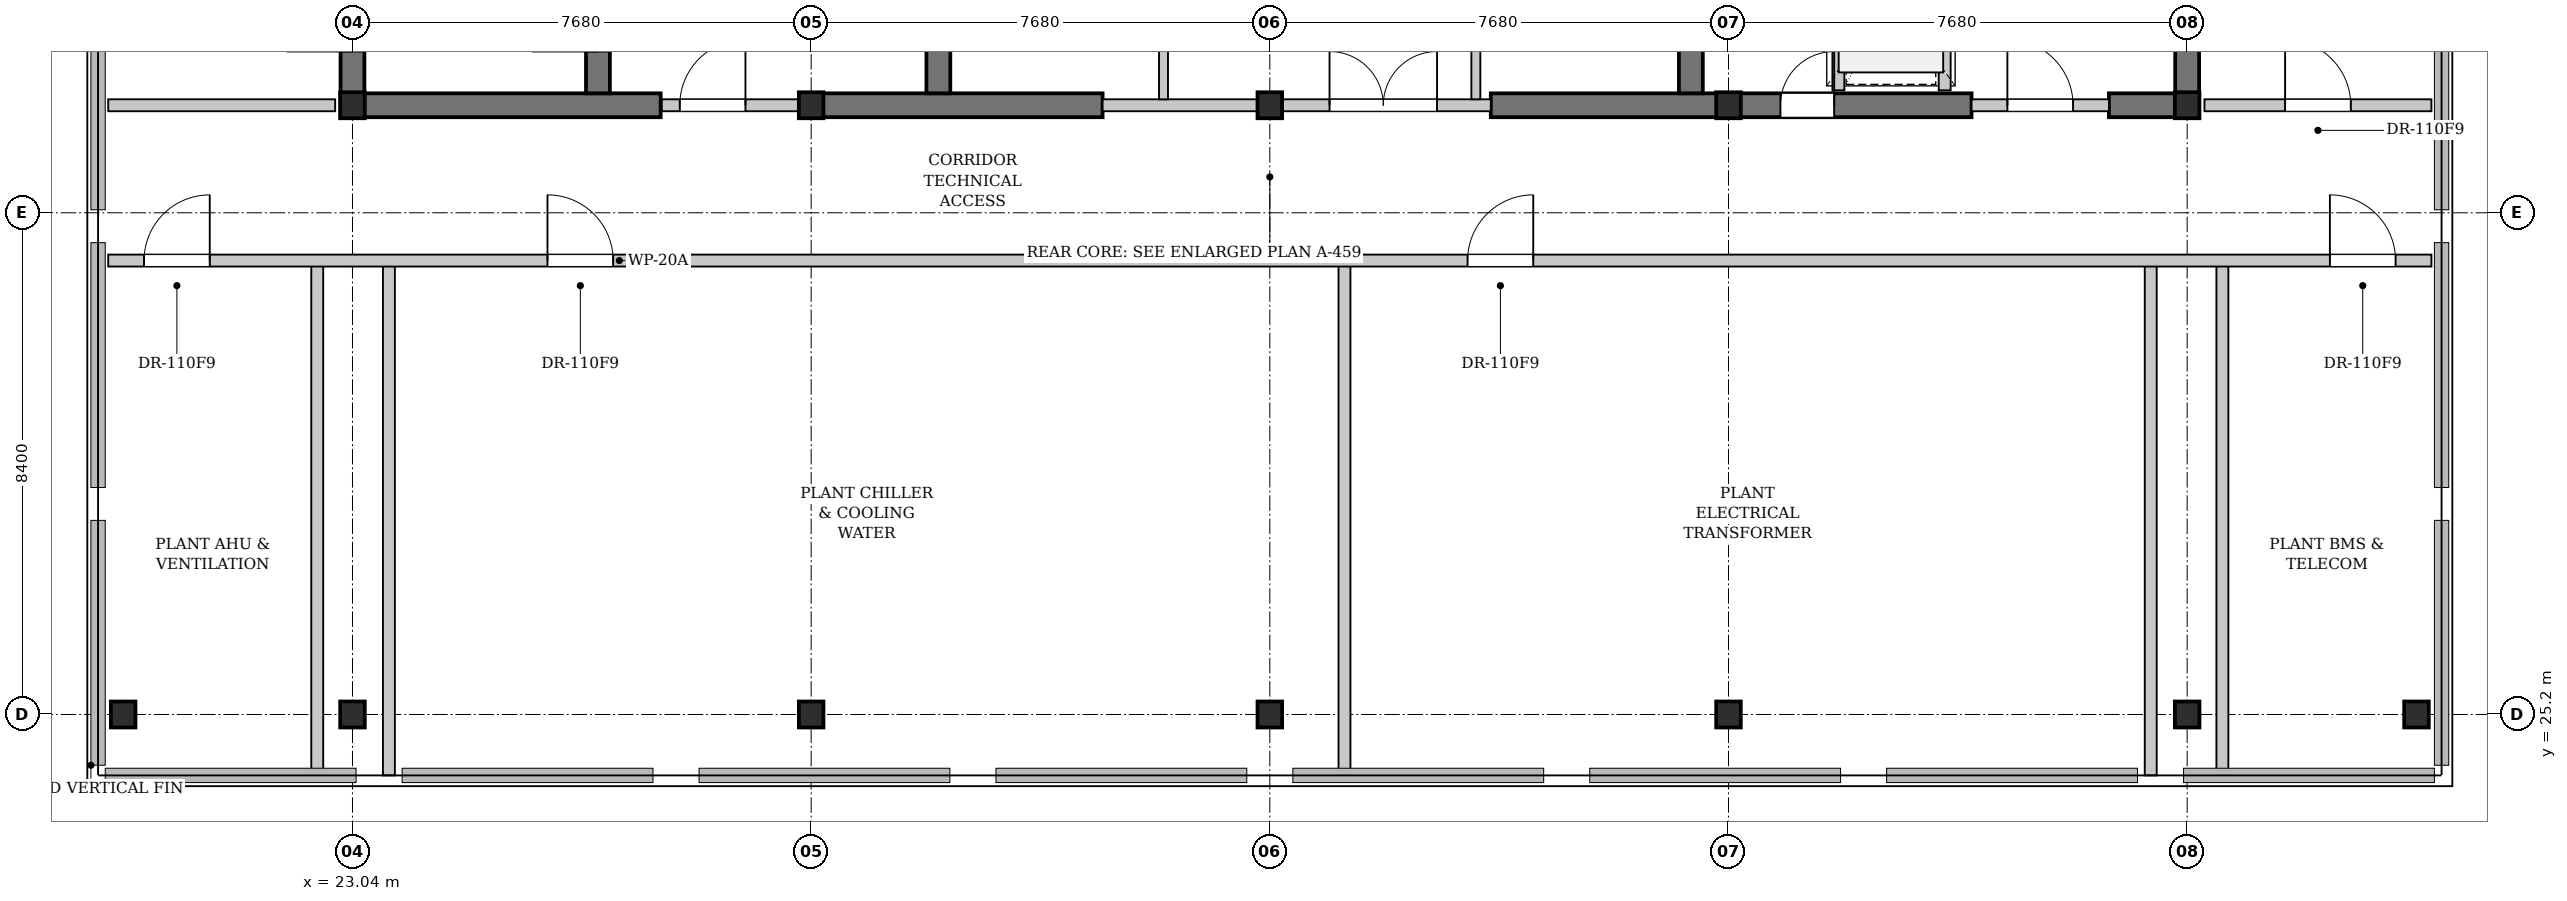
"""IFC4 building model, lengths in metres.
Left out: names, types, materials, properties, quantities, classifications, styles, units other than length and angle.
Written with IfcOpenShell. Run it as: python <this file> out.ifc"""

import sys

from ifc_helpers import new_model, si_unit, direction, frame, frame_2d, origin, origin_2d, place, context, subcontext, project, spatial, rectangle, i_section, extrude, element, fill, save


model = new_model("IFC4")
c1 = context("Model", 3, precision=1e-05, world=origin(), true_north=direction((0.0, 1.0)))
c2 = subcontext(c1, "Body", "Model", "MODEL_VIEW")
j1 = project(units=[si_unit("LENGTHUNIT", "METRE"), si_unit("PLANEANGLEUNIT", "RADIAN")], contexts=[c1])
p1 = place(None, origin())
s1 = spatial("IfcSite", under=j1, at=p1, CompositionType="ELEMENT")
p2 = place(p1, origin())
s2 = spatial("IfcBuilding", under=s1, at=p2, CompositionType="ELEMENT")
p3 = place(p2, frame((0.0, 0.0, 251.3)))
s3 = spatial("IfcBuildingStorey", under=s2, at=p3, CompositionType="ELEMENT", Elevation=251.3)
p4 = place(p3, frame((22.84, 35.4, 0.0), z_axis=(0.0, 0.0, 1.0), x_axis=(1.0, 0.0, 0.0)))
e1 = element("IfcWall", 1, at=p4, inside=s3, PredefinedType="SHEAR", context=c2, shape_type="SweptSolid", body=[
    extrude(rectangle(XDim=5.36, YDim=0.4, at=frame_2d((2.68, 0.0))), origin(), (0.0, 0.0, 1.0), 3.48),
])
p5 = place(p3, frame((30.72, 35.4, 0.0), z_axis=(0.0, 0.0, 1.0), x_axis=(1.0, 0.0, 0.0)))
e2 = element("IfcWall", 2, at=p5, inside=s3, PredefinedType="SHEAR", context=c2, shape_type="SweptSolid", body=[
    extrude(rectangle(XDim=4.88, YDim=0.4, at=frame_2d((2.44, 0.0))), origin(), (0.0, 0.0, 1.0), 3.48),
])
p6 = place(p3, frame((42.1, 35.4, 0.0), z_axis=(0.0, 0.0, 1.0), x_axis=(1.0, 0.0, 0.0)))
e3 = element("IfcWall", 3, at=p6, inside=s3, PredefinedType="SHEAR", context=c2, shape_type="SweptSolid", body=[
    extrude(rectangle(XDim=8.05, YDim=0.4, at=frame_2d((4.025, 0.0))), origin(), (0.0, 0.0, 1.0), 3.48),
])
p7 = place(p6, frame((4.85, 0.0, 0.0)))
e4 = element("IfcOpeningElement", 4, at=p7, cuts=e3, PredefinedType="OPENING", context=c2, shape_type="SweptSolid", body=[
    extrude(rectangle(XDim=0.9, YDim=2.15, at=frame_2d((0.45, 1.075))), frame((0.0, 0.21, 0.0), z_axis=(0.0, -1.0, 0.0), x_axis=(1.0, 0.0, 0.0)), (0.0, 0.0, 1.0), 0.42),
])
p8 = place(p3, frame((52.45, 35.4, 0.0), z_axis=(0.0, 0.0, 1.0), x_axis=(1.0, 0.0, 0.0)))
e5 = element("IfcWall", 5, at=p8, inside=s3, PredefinedType="SHEAR", context=c2, shape_type="SweptSolid", body=[
    extrude(rectangle(XDim=1.51, YDim=0.4, at=frame_2d((0.755, 0.0))), origin(), (0.0, 0.0, 1.0), 3.48),
])
p9 = place(p3, frame((23.04, 35.6, 0.0), z_axis=(0.0, 0.0, 1.0), x_axis=(0.0, 1.0, 0.0)))
e6 = element("IfcWall", 6, at=p9, inside=s3, PredefinedType="SHEAR", context=c2, shape_type="SweptSolid", body=[
    extrude(rectangle(XDim=10.4, YDim=0.4, at=frame_2d((5.2, 0.0))), origin(), (0.0, 0.0, 1.0), 3.48),
])
p10 = place(p9, frame((0.7, 0.0, 0.0)))
e7 = element("IfcOpeningElement", 7, at=p10, cuts=e6, PredefinedType="OPENING", context=c2, shape_type="SweptSolid", body=[
    extrude(rectangle(XDim=1.1, YDim=2.15, at=frame_2d((0.55, 1.075))), frame((0.0, 0.21, 0.0), z_axis=(0.0, -1.0, 0.0), x_axis=(1.0, 0.0, 0.0)), (0.0, 0.0, 1.0), 0.42),
])
p11 = place(p3, frame((27.15, 35.6, 0.0), z_axis=(0.0, 0.0, 1.0), x_axis=(0.0, 1.0, 0.0)))
e8 = element("IfcWall", 8, at=p11, inside=s3, PredefinedType="SHEAR", context=c2, shape_type="SweptSolid", body=[
    extrude(rectangle(XDim=10.4, YDim=0.4, at=frame_2d((5.2, 0.0))), origin(), (0.0, 0.0, 1.0), 3.48),
])
p12 = place(p11, frame((0.7, 0.0, 0.0)))
e9 = element("IfcOpeningElement", 9, at=p12, cuts=e8, PredefinedType="OPENING", context=c2, shape_type="SweptSolid", body=[
    extrude(rectangle(XDim=1.1, YDim=2.15, at=frame_2d((0.55, 1.075))), frame((0.0, 0.21, 0.0), z_axis=(0.0, -1.0, 0.0), x_axis=(1.0, 0.0, 0.0)), (0.0, 0.0, 1.0), 0.42),
])
for number, where, z_axis, x_axis in (
    (10, (32.85, 35.6, 0.0), (0.0, 0.0, 1.0), (0.0, 1.0, 0.0)),
    (11, (45.45, 35.6, 0.0), (0.0, 0.0, 1.0), (0.0, 1.0, 0.0)),
    (12, (53.76, 35.6, 0.0), (0.0, 0.0, 1.0), (0.0, 1.0, 0.0)),
):
    element("IfcWall", number, at=place(p3, frame(where, z_axis=z_axis, x_axis=x_axis)), inside=s3, PredefinedType="SHEAR", context=c2, shape_type="SweptSolid", body=[
        extrude(rectangle(XDim=10.4, YDim=0.4, at=frame_2d((5.2, 0.0))), origin(), (0.0, 0.0, 1.0), 3.48),
    ])
for number, where, z_axis, x_axis in (
    (13, (23.04, 35.4, 0.0), (0.0, 0.0, 1.0), (1.0, 0.0, 0.0)),
    (14, (23.04, 25.2, 0.0), (0.0, 0.0, 1.0), (1.0, 0.0, 0.0)),
    (15, (30.72, 35.4, 0.0), (0.0, 0.0, 1.0), (1.0, 0.0, 0.0)),
    (16, (30.72, 25.2, 0.0), (0.0, 0.0, 1.0), (1.0, 0.0, 0.0)),
    (17, (38.4, 35.4, 0.0), (0.0, 0.0, 1.0), (1.0, 0.0, 0.0)),
    (18, (38.4, 25.2, 0.0), (0.0, 0.0, 1.0), (1.0, 0.0, 0.0)),
    (19, (46.08, 35.4, 0.0), (0.0, 0.0, 1.0), (1.0, 0.0, 0.0)),
    (20, (46.08, 25.2, 0.0), (0.0, 0.0, 1.0), (1.0, 0.0, 0.0)),
    (21, (53.76, 35.4, 0.0), (0.0, 0.0, 1.0), (1.0, 0.0, 0.0)),
    (22, (53.76, 25.2, 0.0), (0.0, 0.0, 1.0), (1.0, 0.0, 0.0)),
    (23, (19.2, 25.2, 0.0), (0.0, 0.0, 1.0), (1.0, 0.0, 0.0)),
    (24, (57.6, 25.2, 0.0), (0.0, 0.0, 1.0), (1.0, 0.0, 0.0)),
):
    element("IfcColumn", number, at=place(p3, frame(where, z_axis=z_axis, x_axis=x_axis)), inside=s3, PredefinedType="COLUMN", context=c2, shape_type="SweptSolid", body=[
        extrude(i_section(OverallWidth=0.412, OverallDepth=0.435, WebThickness=0.036, FlangeThickness=0.058, FilletRadius=0.015, at=origin_2d()), origin(), (0.0, 0.0, 1.0), 3.9),
    ])
p13 = place(p3, frame((28.22, 35.4, 0.0), z_axis=(0.0, 0.0, 1.0), x_axis=(1.0, 0.0, 0.0)))
e25 = element("IfcWall", 25, at=p13, inside=s3, PredefinedType="PARTITIONING", context=c2, shape_type="SweptSolid", body=[
    extrude(rectangle(XDim=2.5, YDim=0.2, at=frame_2d((1.25, 0.0))), origin(), (0.0, 0.0, 1.0), 2.661),
])
p14 = place(p13, frame((0.3, 0.0, 0.0)))
e26 = element("IfcOpeningElement", 26, at=p14, cuts=e25, PredefinedType="OPENING", context=c2, shape_type="SweptSolid", body=[
    extrude(rectangle(XDim=1.1, YDim=2.15, at=frame_2d((0.55, 1.075))), frame((0.0, 0.11, 0.0), z_axis=(0.0, -1.0, 0.0), x_axis=(1.0, 0.0, 0.0)), (0.0, 0.0, 1.0), 0.22),
])
p15 = place(p3, frame((35.6, 35.4, 0.0), z_axis=(0.0, 0.0, 1.0), x_axis=(1.0, 0.0, 0.0)))
e27 = element("IfcWall", 27, at=p15, inside=s3, PredefinedType="PARTITIONING", context=c2, shape_type="SweptSolid", body=[
    extrude(rectangle(XDim=6.5, YDim=0.2, at=frame_2d((3.25, 0.0))), origin(), (0.0, 0.0, 1.0), 2.661),
])
p16 = place(p15, frame((3.8, 0.0, 0.0)))
e28 = element("IfcOpeningElement", 28, at=p16, cuts=e27, PredefinedType="OPENING", context=c2, shape_type="SweptSolid", body=[
    extrude(rectangle(XDim=1.8, YDim=2.3, at=frame_2d((0.9, 1.15))), frame((0.0, 0.11, 0.0), z_axis=(0.0, -1.0, 0.0), x_axis=(1.0, 0.0, 0.0)), (0.0, 0.0, 1.0), 0.22),
])
p17 = place(p3, frame((36.62, 35.5, 0.0), z_axis=(0.0, 0.0, 1.0), x_axis=(0.0, 1.0, 0.0)))
e29 = element("IfcWall", 29, at=p17, inside=s3, PredefinedType="PARTITIONING", context=c2, shape_type="SweptSolid", body=[
    extrude(rectangle(XDim=10.42, YDim=0.15, at=frame_2d((5.21, 0.0))), origin(), (0.0, 0.0, 1.0), 3.48),
])
p18 = place(p17, frame((3.92, 0.0, 0.0)))
e30 = element("IfcOpeningElement", 30, at=p18, cuts=e29, PredefinedType="OPENING", context=c2, shape_type="SweptSolid", body=[
    extrude(rectangle(XDim=0.9, YDim=2.15, at=frame_2d((0.45, 1.075))), frame((0.0, 0.085, 0.0), z_axis=(0.0, -1.0, 0.0), x_axis=(1.0, 0.0, 0.0)), (0.0, 0.0, 1.0), 0.17),
])
p19 = place(p17, frame((5.85, 0.0, 0.0)))
e31 = element("IfcOpeningElement", 31, at=p19, cuts=e29, PredefinedType="OPENING", context=c2, shape_type="SweptSolid", body=[
    extrude(rectangle(XDim=0.9, YDim=2.15, at=frame_2d((0.45, 1.075))), frame((0.0, 0.085, 0.0), z_axis=(0.0, -1.0, 0.0), x_axis=(1.0, 0.0, 0.0)), (0.0, 0.0, 1.0), 0.17),
])
p20 = place(p3, frame((41.85, 35.5, 0.0), z_axis=(0.0, 0.0, 1.0), x_axis=(0.0, 1.0, 0.0)))
e32 = element("IfcWall", 32, at=p20, inside=s3, PredefinedType="PARTITIONING", context=c2, shape_type="SweptSolid", body=[
    extrude(rectangle(XDim=10.42, YDim=0.15, at=frame_2d((5.21, 0.0))), origin(), (0.0, 0.0, 1.0), 3.48),
])
p21 = place(p20, frame((3.92, 0.0, 0.0)))
e33 = element("IfcOpeningElement", 33, at=p21, cuts=e32, PredefinedType="OPENING", context=c2, shape_type="SweptSolid", body=[
    extrude(rectangle(XDim=0.9, YDim=2.15, at=frame_2d((0.45, 1.075))), frame((0.0, 0.085, 0.0), z_axis=(0.0, -1.0, 0.0), x_axis=(1.0, 0.0, 0.0)), (0.0, 0.0, 1.0), 0.17),
])
p22 = place(p20, frame((5.85, 0.0, 0.0)))
e34 = element("IfcOpeningElement", 34, at=p22, cuts=e32, PredefinedType="OPENING", context=c2, shape_type="SweptSolid", body=[
    extrude(rectangle(XDim=0.9, YDim=2.15, at=frame_2d((0.45, 1.075))), frame((0.0, 0.085, 0.0), z_axis=(0.0, -1.0, 0.0), x_axis=(1.0, 0.0, 0.0)), (0.0, 0.0, 1.0), 0.17),
])
p23 = place(p3, frame((50.15, 35.4, 0.0), z_axis=(0.0, 0.0, 1.0), x_axis=(1.0, 0.0, 0.0)))
e35 = element("IfcWall", 35, at=p23, inside=s3, PredefinedType="PARTITIONING", context=c2, shape_type="SweptSolid", body=[
    extrude(rectangle(XDim=2.3, YDim=0.2, at=frame_2d((1.15, 0.0))), origin(), (0.0, 0.0, 1.0), 2.661),
])
p24 = place(p23, frame((0.6, 0.0, 0.0)))
e36 = element("IfcOpeningElement", 36, at=p24, cuts=e35, PredefinedType="OPENING", context=c2, shape_type="SweptSolid", body=[
    extrude(rectangle(XDim=1.1, YDim=2.15, at=frame_2d((0.55, 1.075))), frame((0.0, 0.11, 0.0), z_axis=(0.0, -1.0, 0.0), x_axis=(1.0, 0.0, 0.0)), (0.0, 0.0, 1.0), 0.22),
])
p25 = place(p3, frame((49.7, 35.65, 0.0), z_axis=(0.0, 0.0, 1.0), x_axis=(0.0, 1.0, 0.0)))
e37 = element("IfcWall", 37, at=p25, inside=s3, PredefinedType="PARTITIONING", context=c2, shape_type="SweptSolid", body=[
    extrude(rectangle(XDim=3.15, YDim=0.2, at=frame_2d((1.575, 0.0))), origin(), (0.0, 0.0, 1.0), 3.48),
])
p26 = place(p25, frame((0.85, 0.0, 0.0)))
e38 = element("IfcOpeningElement", 38, at=p26, cuts=e37, PredefinedType="OPENING", context=c2, shape_type="SweptSolid", body=[
    extrude(rectangle(XDim=1.2, YDim=2.2, at=frame_2d((0.6, 1.1))), frame((0.0, 0.11, 0.0), z_axis=(0.0, -1.0, 0.0), x_axis=(1.0, 0.0, 0.0)), (0.0, 0.0, 1.0), 0.22),
])
p27 = place(p3, frame((47.92, 35.65, 0.0), z_axis=(0.0, 0.0, 1.0), x_axis=(0.0, 1.0, 0.0)))
e39 = element("IfcWall", 39, at=p27, inside=s3, PredefinedType="PARTITIONING", context=c2, shape_type="SweptSolid", body=[
    extrude(rectangle(XDim=3.15, YDim=0.2, at=frame_2d((1.575, 0.0))), origin(), (0.0, 0.0, 1.0), 3.48),
])
p28 = place(p3, frame((18.95, 35.4, 0.0), z_axis=(0.0, 0.0, 1.0), x_axis=(1.0, 0.0, 0.0)))
e40 = element("IfcWall", 40, at=p28, inside=s3, PredefinedType="PARTITIONING", context=c2, shape_type="SweptSolid", body=[
    extrude(rectangle(XDim=3.8, YDim=0.2, at=frame_2d((1.9, 0.0))), origin(), (0.0, 0.0, 1.0), 3.48),
])
p29 = place(p3, frame((54.05, 35.4, 0.0), z_axis=(0.0, 0.0, 1.0), x_axis=(1.0, 0.0, 0.0)))
e41 = element("IfcWall", 41, at=p29, inside=s3, PredefinedType="PARTITIONING", context=c2, shape_type="SweptSolid", body=[
    extrude(rectangle(XDim=3.8, YDim=0.2, at=frame_2d((1.9, 0.0))), origin(), (0.0, 0.0, 1.0), 3.48),
])
p30 = place(p29, frame((1.35, 0.0, 0.0)))
e42 = element("IfcOpeningElement", 42, at=p30, cuts=e41, PredefinedType="OPENING", context=c2, shape_type="SweptSolid", body=[
    extrude(rectangle(XDim=1.1, YDim=2.15, at=frame_2d((0.55, 1.075))), frame((0.0, 0.11, 0.0), z_axis=(0.0, -1.0, 0.0), x_axis=(1.0, 0.0, 0.0)), (0.0, 0.0, 1.0), 0.22),
])
for number, where, z_axis, x_axis in (
    (43, (22.45, 24.18, 0.0), (0.0, 0.0, 1.0), (0.0, 1.0, 0.0)),
    (44, (23.65, 24.18, 0.0), (0.0, 0.0, 1.0), (0.0, 1.0, 0.0)),
    (45, (39.65, 24.18, 0.0), (0.0, 0.0, 1.0), (0.0, 1.0, 0.0)),
    (46, (53.15, 24.18, 0.0), (0.0, 0.0, 1.0), (0.0, 1.0, 0.0)),
    (47, (54.35, 24.18, 0.0), (0.0, 0.0, 1.0), (0.0, 1.0, 0.0)),
):
    element("IfcWall", number, at=place(p3, frame(where, z_axis=z_axis, x_axis=x_axis)), inside=s3, PredefinedType="PARTITIONING", context=c2, shape_type="SweptSolid", body=[
        extrude(rectangle(XDim=8.62, YDim=0.2, at=frame_2d((4.31, 0.0))), origin(), (0.0, 0.0, 1.0), 3.48),
    ])
p31 = place(p3, frame((18.95, 32.8, 0.0), z_axis=(0.0, 0.0, 1.0), x_axis=(1.0, 0.0, 0.0)))
e48 = element("IfcWall", 48, at=p31, inside=s3, PredefinedType="PARTITIONING", context=c2, shape_type="SweptSolid", body=[
    extrude(rectangle(XDim=38.9, YDim=0.2, at=frame_2d((19.45, 0.0))), origin(), (0.0, 0.0, 1.0), 3.48),
])
p32 = place(p31, frame((0.6, 0.0, 0.0)))
e49 = element("IfcOpeningElement", 49, at=p32, cuts=e48, PredefinedType="OPENING", context=c2, shape_type="SweptSolid", body=[
    extrude(rectangle(XDim=1.1, YDim=2.15, at=frame_2d((0.55, 1.075))), frame((0.0, 0.11, 0.0), z_axis=(0.0, -1.0, 0.0), x_axis=(1.0, 0.0, 0.0)), (0.0, 0.0, 1.0), 0.22),
])
p33 = place(p31, frame((7.355, 0.0, 0.0)))
e50 = element("IfcOpeningElement", 50, at=p33, cuts=e48, PredefinedType="OPENING", context=c2, shape_type="SweptSolid", body=[
    extrude(rectangle(XDim=1.1, YDim=2.15, at=frame_2d((0.55, 1.075))), frame((0.0, 0.11, 0.0), z_axis=(0.0, -1.0, 0.0), x_axis=(1.0, 0.0, 0.0)), (0.0, 0.0, 1.0), 0.22),
])
p34 = place(p31, frame((22.761, 0.0, 0.0)))
e51 = element("IfcOpeningElement", 51, at=p34, cuts=e48, PredefinedType="OPENING", context=c2, shape_type="SweptSolid", body=[
    extrude(rectangle(XDim=1.1, YDim=2.15, at=frame_2d((0.55, 1.075))), frame((0.0, 0.11, 0.0), z_axis=(0.0, -1.0, 0.0), x_axis=(1.0, 0.0, 0.0)), (0.0, 0.0, 1.0), 0.22),
])
p35 = place(p31, frame((37.2, 0.0, 0.0)))
e52 = element("IfcOpeningElement", 52, at=p35, cuts=e48, PredefinedType="OPENING", context=c2, shape_type="SweptSolid", body=[
    extrude(rectangle(XDim=1.1, YDim=2.15, at=frame_2d((0.55, 1.075))), frame((0.0, 0.11, 0.0), z_axis=(0.0, -1.0, 0.0), x_axis=(1.0, 0.0, 0.0)), (0.0, 0.0, 1.0), 0.22),
])
p36 = place(p14, origin())
e53 = element("IfcDoor", 53, at=p36, inside=s3, OperationType="SINGLE_SWING_RIGHT", PredefinedType="DOOR", context=c2, shape_type="SweptSolid", body=[
    extrude(rectangle(XDim=1.1, YDim=2.15, at=frame_2d((0.55, 1.075))), frame((0.0, 0.025, 0.0), z_axis=(0.0, -1.0, 0.0), x_axis=(1.0, 0.0, 0.0)), (0.0, 0.0, 1.0), 0.05),
])
fill(e26, e53)
p37 = place(p16, origin())
e54 = element("IfcDoor", 54, at=p37, inside=s3, OperationType="DOUBLE_DOOR_SINGLE_SWING", PredefinedType="DOOR", context=c2, shape_type="SweptSolid", body=[
    extrude(rectangle(XDim=1.8, YDim=2.3, at=frame_2d((0.9, 1.15))), frame((0.0, 0.025, 0.0), z_axis=(0.0, -1.0, 0.0), x_axis=(1.0, 0.0, 0.0)), (0.0, 0.0, 1.0), 0.05),
])
fill(e28, e54)
p38 = place(p24, origin())
e55 = element("IfcDoor", 55, at=p38, inside=s3, OperationType="SINGLE_SWING_LEFT", PredefinedType="DOOR", context=c2, shape_type="SweptSolid", body=[
    extrude(rectangle(XDim=1.1, YDim=2.15, at=frame_2d((0.55, 1.075))), frame((0.0, 0.025, 0.0), z_axis=(0.0, -1.0, 0.0), x_axis=(1.0, 0.0, 0.0)), (0.0, 0.0, 1.0), 0.05),
])
fill(e36, e55)
p39 = place(p30, origin())
e56 = element("IfcDoor", 56, at=p39, inside=s3, OperationType="SINGLE_SWING_LEFT", PredefinedType="DOOR", context=c2, shape_type="SweptSolid", body=[
    extrude(rectangle(XDim=1.1, YDim=2.15, at=frame_2d((0.55, 1.075))), frame((0.0, 0.025, 0.0), z_axis=(0.0, -1.0, 0.0), x_axis=(1.0, 0.0, 0.0)), (0.0, 0.0, 1.0), 0.05),
])
fill(e42, e56)
p40 = place(p32, origin())
e57 = element("IfcDoor", 57, at=p40, inside=s3, OperationType="SINGLE_SWING_RIGHT", PredefinedType="DOOR", context=c2, shape_type="SweptSolid", body=[
    extrude(rectangle(XDim=1.1, YDim=2.15, at=frame_2d((0.55, 1.075))), frame((0.0, 0.025, 0.0), z_axis=(0.0, -1.0, 0.0), x_axis=(1.0, 0.0, 0.0)), (0.0, 0.0, 1.0), 0.05),
])
fill(e49, e57)
p41 = place(p33, origin())
e58 = element("IfcDoor", 58, at=p41, inside=s3, OperationType="SINGLE_SWING_LEFT", PredefinedType="DOOR", context=c2, shape_type="SweptSolid", body=[
    extrude(rectangle(XDim=1.1, YDim=2.15, at=frame_2d((0.55, 1.075))), frame((0.0, 0.025, 0.0), z_axis=(0.0, -1.0, 0.0), x_axis=(1.0, 0.0, 0.0)), (0.0, 0.0, 1.0), 0.05),
])
fill(e50, e58)
p42 = place(p34, origin())
e59 = element("IfcDoor", 59, at=p42, inside=s3, OperationType="SINGLE_SWING_RIGHT", PredefinedType="DOOR", context=c2, shape_type="SweptSolid", body=[
    extrude(rectangle(XDim=1.1, YDim=2.15, at=frame_2d((0.55, 1.075))), frame((0.0, 0.025, 0.0), z_axis=(0.0, -1.0, 0.0), x_axis=(1.0, 0.0, 0.0)), (0.0, 0.0, 1.0), 0.05),
])
fill(e51, e59)
p43 = place(p35, origin())
e60 = element("IfcDoor", 60, at=p43, inside=s3, OperationType="SINGLE_SWING_LEFT", PredefinedType="DOOR", context=c2, shape_type="SweptSolid", body=[
    extrude(rectangle(XDim=1.1, YDim=2.15, at=frame_2d((0.55, 1.075))), frame((0.0, 0.025, 0.0), z_axis=(0.0, -1.0, 0.0), x_axis=(1.0, 0.0, 0.0)), (0.0, 0.0, 1.0), 0.05),
])
fill(e52, e60)
p44 = place(p7, origin())
e61 = element("IfcDoor", 61, at=p44, inside=s3, OperationType="SINGLE_SWING_RIGHT", PredefinedType="DOOR", context=c2, shape_type="SweptSolid", body=[
    extrude(rectangle(XDim=0.9, YDim=2.15, at=frame_2d((0.45, 1.075))), frame((0.0, 0.025, 0.0), z_axis=(0.0, -1.0, 0.0), x_axis=(1.0, 0.0, 0.0)), (0.0, 0.0, 1.0), 0.05),
])
fill(e4, e61)
save(model, sys.argv[1])
